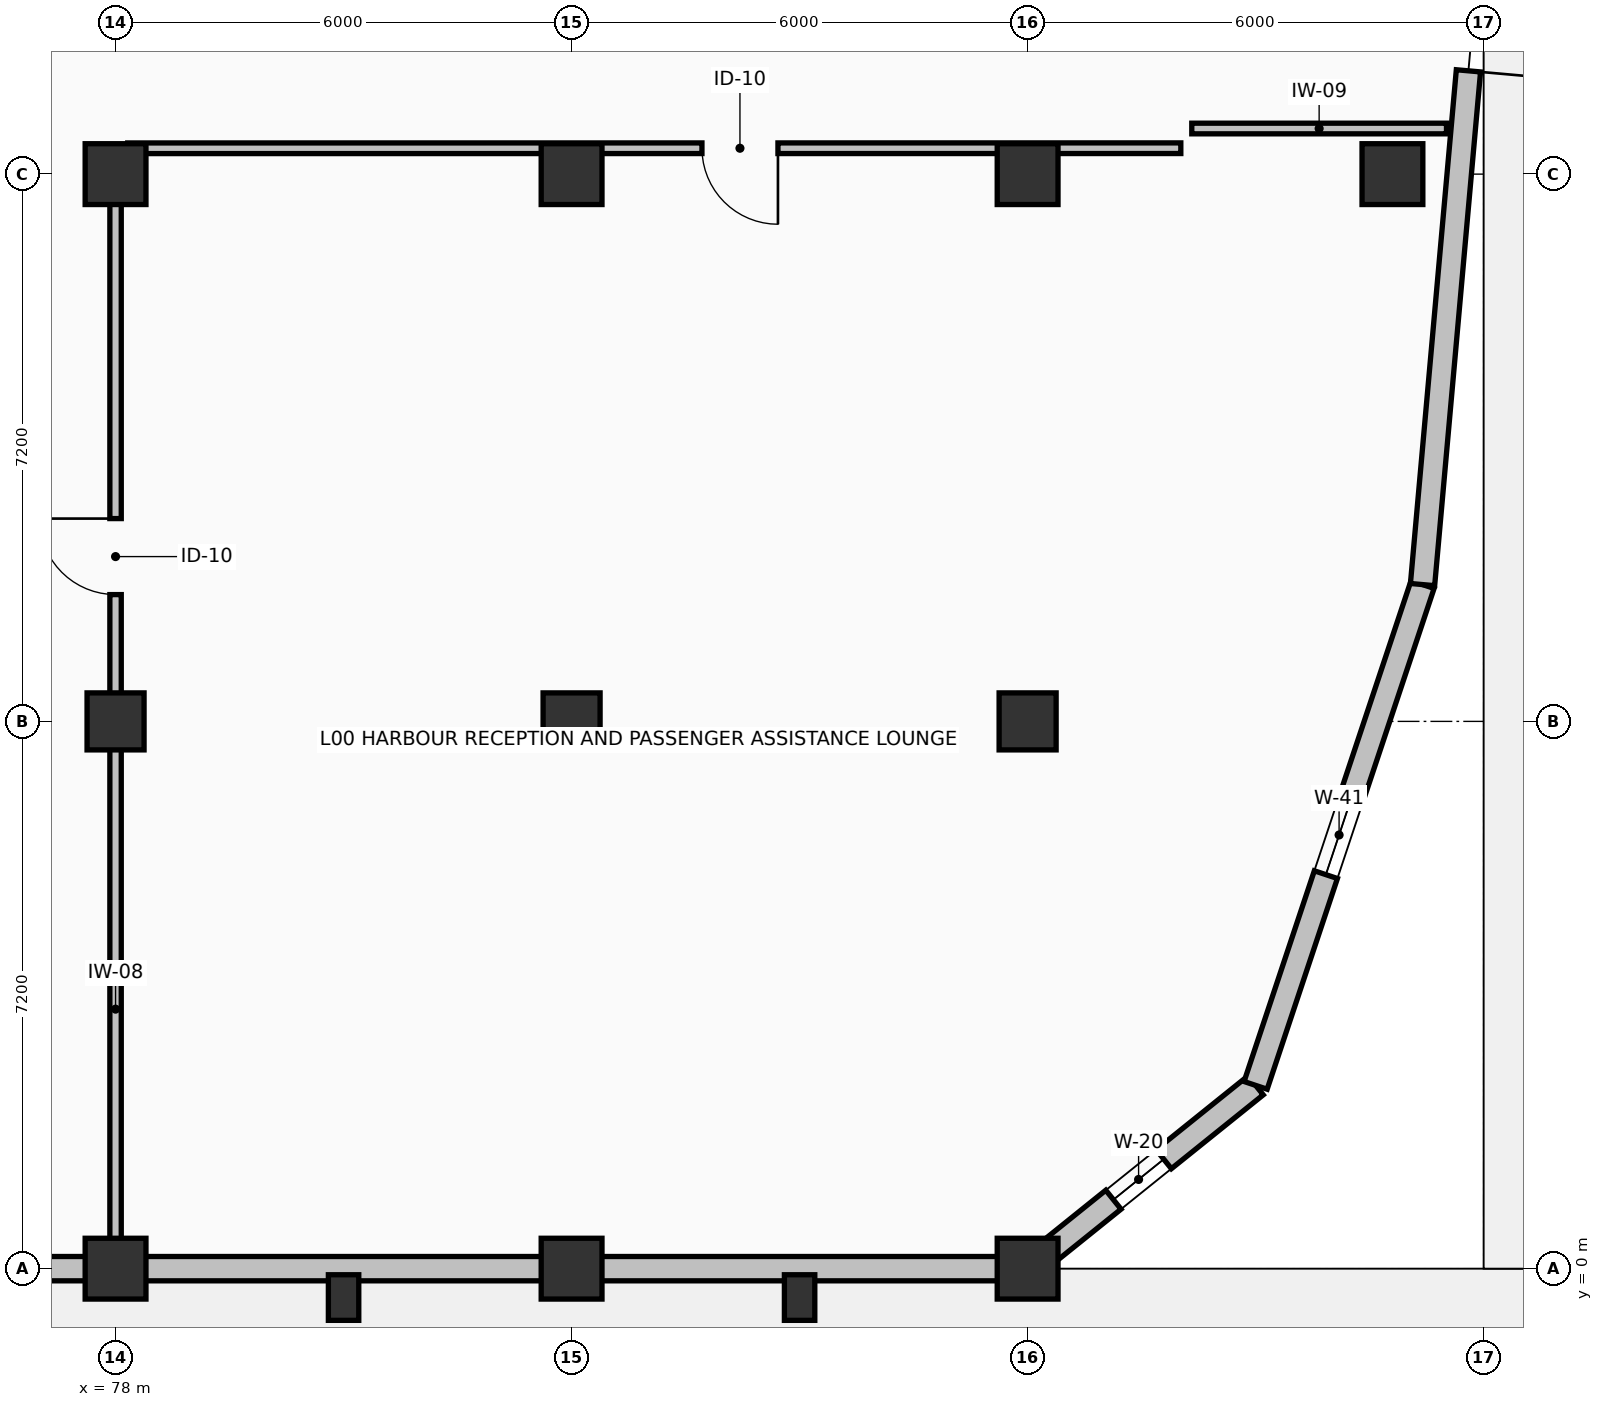
"""IFC4 building model, lengths in metres.
Left out: names, types, materials, properties, quantities, classifications, styles, units other than length and angle.
Written with IfcOpenShell. Run it as: python <this file> out.ifc"""

import sys

from ifc_helpers import new_model, si_unit, direction, frame, frame_2d, origin, origin_2d, place, context, subcontext, project, spatial, rectangle, extrude, element, fill, save


model = new_model("IFC4")
c1 = context("Model", 3, precision=1e-05, world=origin(), true_north=direction((0.0, 1.0)))
c2 = subcontext(c1, "Body", "Model", "MODEL_VIEW")
j1 = project(units=[si_unit("LENGTHUNIT", "METRE"), si_unit("PLANEANGLEUNIT", "RADIAN")], contexts=[c1])
p1 = place(None, origin())
s1 = spatial("IfcSite", under=j1, at=p1, CompositionType="ELEMENT")
p2 = place(p1, origin())
s2 = spatial("IfcBuilding", under=s1, at=p2, CompositionType="ELEMENT")
p3 = place(p2, origin())
s3 = spatial("IfcBuildingStorey", under=s2, at=p3, CompositionType="ELEMENT", Elevation=0.0)
p4 = place(p3, frame((78.0, 0.0, 0.0), z_axis=(0.0, 0.0, 1.0), x_axis=(1.0, 0.0, 0.0)))
e1 = element("IfcColumn", 1, at=p4, inside=s3, PredefinedType="COLUMN", context=c2, shape_type="SweptSolid", body=[
    extrude(rectangle(XDim=0.8, YDim=0.8, at=origin_2d()), origin(), (0.0, 0.0, 1.0), 5.76),
])
p5 = place(p3, frame((78.0, 7.2, 0.0), z_axis=(0.0, 0.0, 1.0), x_axis=(1.0, 0.0, 0.0)))
e2 = element("IfcColumn", 2, at=p5, inside=s3, PredefinedType="COLUMN", context=c2, shape_type="SweptSolid", body=[
    extrude(rectangle(XDim=0.75, YDim=0.75, at=origin_2d()), origin(), (0.0, 0.0, 1.0), 5.76),
])
for number, where, z_axis, x_axis in (
    (3, (78.0, 14.4, 0.0), (0.0, 0.0, 1.0), (1.0, 0.0, 0.0)),
    (4, (84.0, 0.0, 0.0), (0.0, 0.0, 1.0), (1.0, 0.0, 0.0)),
):
    element("IfcColumn", number, at=place(p3, frame(where, z_axis=z_axis, x_axis=x_axis)), inside=s3, PredefinedType="COLUMN", context=c2, shape_type="SweptSolid", body=[
        extrude(rectangle(XDim=0.8, YDim=0.8, at=origin_2d()), origin(), (0.0, 0.0, 1.0), 5.76),
    ])
p6 = place(p3, frame((84.0, 7.2, 0.0), z_axis=(0.0, 0.0, 1.0), x_axis=(1.0, 0.0, 0.0)))
e5 = element("IfcColumn", 5, at=p6, inside=s3, PredefinedType="COLUMN", context=c2, shape_type="SweptSolid", body=[
    extrude(rectangle(XDim=0.75, YDim=0.75, at=origin_2d()), origin(), (0.0, 0.0, 1.0), 5.76),
])
for number, where, z_axis, x_axis in (
    (6, (84.0, 14.4, 0.0), (0.0, 0.0, 1.0), (1.0, 0.0, 0.0)),
    (7, (90.0, 0.0, 0.0), (0.0, 0.0, 1.0), (1.0, 0.0, 0.0)),
):
    element("IfcColumn", number, at=place(p3, frame(where, z_axis=z_axis, x_axis=x_axis)), inside=s3, PredefinedType="COLUMN", context=c2, shape_type="SweptSolid", body=[
        extrude(rectangle(XDim=0.8, YDim=0.8, at=origin_2d()), origin(), (0.0, 0.0, 1.0), 5.76),
    ])
p7 = place(p3, frame((90.0, 7.2, 0.0), z_axis=(0.0, 0.0, 1.0), x_axis=(1.0, 0.0, 0.0)))
e8 = element("IfcColumn", 8, at=p7, inside=s3, PredefinedType="COLUMN", context=c2, shape_type="SweptSolid", body=[
    extrude(rectangle(XDim=0.75, YDim=0.75, at=origin_2d()), origin(), (0.0, 0.0, 1.0), 5.76),
])
for number, where, z_axis, x_axis in (
    (9, (90.0, 14.4, 0.0), (0.0, 0.0, 1.0), (1.0, 0.0, 0.0)),
    (10, (94.8, 14.4, 0.0), (0.0, 0.0, 1.0), (1.0, 0.0, 0.0)),
):
    element("IfcColumn", number, at=place(p3, frame(where, z_axis=z_axis, x_axis=x_axis)), inside=s3, PredefinedType="COLUMN", context=c2, shape_type="SweptSolid", body=[
        extrude(rectangle(XDim=0.8, YDim=0.8, at=origin_2d()), origin(), (0.0, 0.0, 1.0), 5.76),
    ])
for number, where, z_axis, x_axis in (
    (11, (81.0, -0.38, 0.0), (0.0, 0.0, 1.0), (1.0, 0.0, 0.0)),
    (12, (87.0, -0.38, 0.0), (0.0, 0.0, 1.0), (1.0, 0.0, 0.0)),
):
    element("IfcColumn", number, at=place(p3, frame(where, z_axis=z_axis, x_axis=x_axis)), inside=s3, PredefinedType="PILASTER", context=c2, shape_type="SweptSolid", body=[
        extrude(rectangle(XDim=0.4, YDim=0.6, at=origin_2d()), origin(), (0.0, 0.0, 1.0), 5.76),
    ])
for number, where, z_axis, x_axis in (
    (13, (72.0, 0.0, 0.0), (0.0, 0.0, 1.0), (1.0, 0.0, 0.0)),
    (14, (78.0, 0.0, 0.0), (0.0, 0.0, 1.0), (1.0, 0.0, 0.0)),
    (15, (84.0, 0.0, 0.0), (0.0, 0.0, 1.0), (1.0, 0.0, 0.0)),
):
    element("IfcWall", number, at=place(p3, frame(where, z_axis=z_axis, x_axis=x_axis)), inside=s3, PredefinedType="SOLIDWALL", context=c2, shape_type="SweptSolid", body=[
        extrude(rectangle(XDim=6.0, YDim=0.32, at=frame_2d((3.0, 0.0))), origin(), (0.0, 0.0, 1.0), 4.79),
    ])
p8 = place(p3, frame((90.0, 0.0, 0.0), z_axis=(0.0, 0.0, 1.0), x_axis=(0.779393889884, 0.626534248395, 0.0)))
e16 = element("IfcWall", 16, at=p8, inside=s3, PredefinedType="SOLIDWALL", context=c2, shape_type="SweptSolid", body=[
    extrude(rectangle(XDim=3.849, YDim=0.32, at=frame_2d((1.925, 0.0))), origin(), (0.0, 0.0, 1.0), 5.46),
])
p9 = place(p8, frame((1.448, 0.0, 1.15)))
e17 = element("IfcOpeningElement", 17, at=p9, cuts=e16, PredefinedType="OPENING", context=c2, shape_type="SweptSolid", body=[
    extrude(rectangle(XDim=0.85, YDim=0.85, at=frame_2d((0.425, 0.425))), frame((0.0, 0.17, 0.0), z_axis=(0.0, -1.0, 0.0), x_axis=(1.0, 0.0, 0.0)), (0.0, 0.0, 1.0), 0.34),
])
p10 = place(p3, frame((93.0, 2.412, 0.0), z_axis=(0.0, 0.0, 1.0), x_axis=(0.31624885857, 0.948676266939, 0.0)))
e18 = element("IfcWall", 18, at=p10, inside=s3, PredefinedType="SOLIDWALL", context=c2, shape_type="SweptSolid", body=[
    extrude(rectangle(XDim=6.945, YDim=0.32, at=frame_2d((3.472, 0.0))), origin(), (0.0, 0.0, 1.0), 5.46),
])
p11 = place(p10, frame((2.922, 0.0, 1.15)))
e19 = element("IfcOpeningElement", 19, at=p11, cuts=e18, PredefinedType="OPENING", context=c2, shape_type="SweptSolid", body=[
    extrude(rectangle(XDim=1.1, YDim=1.1, at=frame_2d((0.55, 0.55))), frame((0.0, 0.17, 0.0), z_axis=(0.0, -1.0, 0.0), x_axis=(1.0, 0.0, 0.0)), (0.0, 0.0, 1.0), 0.34),
])
p12 = place(p3, frame((95.196, 9.0, 0.0), z_axis=(0.0, 0.0, 1.0), x_axis=(0.088947255406, 0.996036337568, 0.0)))
e20 = element("IfcWall", 20, at=p12, inside=s3, PredefinedType="SOLIDWALL", context=c2, shape_type="SweptSolid", body=[
    extrude(rectangle(XDim=9.036, YDim=0.32, at=frame_2d((4.518, 0.0))), origin(), (0.0, 0.0, 1.0), 5.46),
])
p13 = place(p12, frame((6.786, 0.0, 0.0)))
e21 = element("IfcOpeningElement", 21, at=p13, cuts=e20, PredefinedType="OPENING", context=c2, shape_type="SweptSolid", body=[
    extrude(rectangle(XDim=1.1, YDim=2.15, at=frame_2d((0.55, 1.075))), frame((0.0, 0.17, 0.0), z_axis=(0.0, -1.0, 0.0), x_axis=(1.0, 0.0, 0.0)), (0.0, 0.0, 1.0), 0.34),
])
p14 = place(p3, frame((78.0, 0.22, 0.0), z_axis=(0.0, 0.0, 1.0), x_axis=(0.0, 1.0, 0.0)))
e22 = element("IfcWall", 22, at=p14, inside=s3, PredefinedType="PARTITIONING", context=c2, shape_type="SweptSolid", body=[
    extrude(rectangle(XDim=14.52, YDim=0.15, at=frame_2d((7.26, 0.0))), origin(), (0.0, 0.0, 1.0), 4.54),
])
p15 = place(p14, frame((8.648, 0.0, 0.0)))
e23 = element("IfcOpeningElement", 23, at=p15, cuts=e22, PredefinedType="OPENING", context=c2, shape_type="SweptSolid", body=[
    extrude(rectangle(XDim=1.0, YDim=2.12, at=frame_2d((0.5, 1.06))), frame((0.0, 0.085, 0.0), z_axis=(0.0, -1.0, 0.0), x_axis=(1.0, 0.0, 0.0)), (0.0, 0.0, 1.0), 0.17),
])
p16 = place(p3, frame((95.511, 15.0, 0.0), z_axis=(0.0, 0.0, 1.0), x_axis=(-1.0, 0.0, 0.0)))
e24 = element("IfcWall", 24, at=p16, inside=s3, PredefinedType="PARTITIONING", context=c2, shape_type="SweptSolid", body=[
    extrude(rectangle(XDim=3.351, YDim=0.14, at=frame_2d((1.676, 0.0))), origin(), (0.0, 0.0, 1.0), 5.2),
])
p17 = place(p3, frame((92.016, 14.741, 0.0), z_axis=(0.0, 0.0, 1.0), x_axis=(-0.999999998603, -5.2860642e-05, 0.0)))
e25 = element("IfcWall", 25, at=p17, inside=s3, PredefinedType="PARTITIONING", context=c2, shape_type="SweptSolid", body=[
    extrude(rectangle(XDim=13.856, YDim=0.14, at=frame_2d((6.928, 0.0))), origin(), (0.0, 0.0, 1.0), 4.79),
])
p18 = place(p17, frame((5.301, 0.0, 0.0)))
e26 = element("IfcOpeningElement", 26, at=p18, cuts=e25, PredefinedType="OPENING", context=c2, shape_type="SweptSolid", body=[
    extrude(rectangle(XDim=1.0, YDim=2.12, at=frame_2d((0.5, 1.06))), frame((0.0, 0.08, 0.0), z_axis=(0.0, -1.0, 0.0), x_axis=(1.0, 0.0, 0.0)), (0.0, 0.0, 1.0), 0.16),
])
p19 = place(p9, origin())
e27 = element("IfcWindow", 27, at=p19, inside=s3, PartitioningType="SINGLE_PANEL", PredefinedType="WINDOW", context=c2, shape_type="SweptSolid", body=[
    extrude(rectangle(XDim=0.85, YDim=0.85, at=frame_2d((0.425, 0.425))), frame((0.0, 0.03, 0.0), z_axis=(0.0, -1.0, 0.0), x_axis=(1.0, 0.0, 0.0)), (0.0, 0.0, 1.0), 0.06),
])
fill(e17, e27)
p20 = place(p11, origin())
e28 = element("IfcWindow", 28, at=p20, inside=s3, PartitioningType="SINGLE_PANEL", PredefinedType="WINDOW", context=c2, shape_type="SweptSolid", body=[
    extrude(rectangle(XDim=1.1, YDim=1.1, at=frame_2d((0.55, 0.55))), frame((0.0, 0.03, 0.0), z_axis=(0.0, -1.0, 0.0), x_axis=(1.0, 0.0, 0.0)), (0.0, 0.0, 1.0), 0.06),
])
fill(e19, e28)
p21 = place(p13, frame((1.1, 0.0, 0.0), z_axis=(0.0, 0.0, 1.0), x_axis=(-1.0, 0.0, 0.0)))
e29 = element("IfcDoor", 29, at=p21, inside=s3, OperationType="SINGLE_SWING_RIGHT", PredefinedType="DOOR", context=c2, shape_type="SweptSolid", body=[
    extrude(rectangle(XDim=1.1, YDim=2.15, at=frame_2d((0.55, 1.075))), frame((0.0, 0.025, 0.0), z_axis=(0.0, -1.0, 0.0), x_axis=(1.0, 0.0, 0.0)), (0.0, 0.0, 1.0), 0.05),
])
fill(e21, e29)
p22 = place(p15, origin())
e30 = element("IfcDoor", 30, at=p22, inside=s3, OperationType="SINGLE_SWING_RIGHT", PredefinedType="DOOR", context=c2, shape_type="SweptSolid", body=[
    extrude(rectangle(XDim=1.0, YDim=2.12, at=frame_2d((0.5, 1.06))), frame((0.0, 0.025, 0.0), z_axis=(0.0, -1.0, 0.0), x_axis=(1.0, 0.0, 0.0)), (0.0, 0.0, 1.0), 0.05),
])
fill(e23, e30)
p23 = place(p18, origin())
e31 = element("IfcDoor", 31, at=p23, inside=s3, OperationType="SINGLE_SWING_LEFT", PredefinedType="DOOR", context=c2, shape_type="SweptSolid", body=[
    extrude(rectangle(XDim=1.0, YDim=2.12, at=frame_2d((0.5, 1.06))), frame((0.0, 0.025, 0.0), z_axis=(0.0, -1.0, 0.0), x_axis=(1.0, 0.0, 0.0)), (0.0, 0.0, 1.0), 0.05),
])
fill(e26, e31)
save(model, sys.argv[1])
